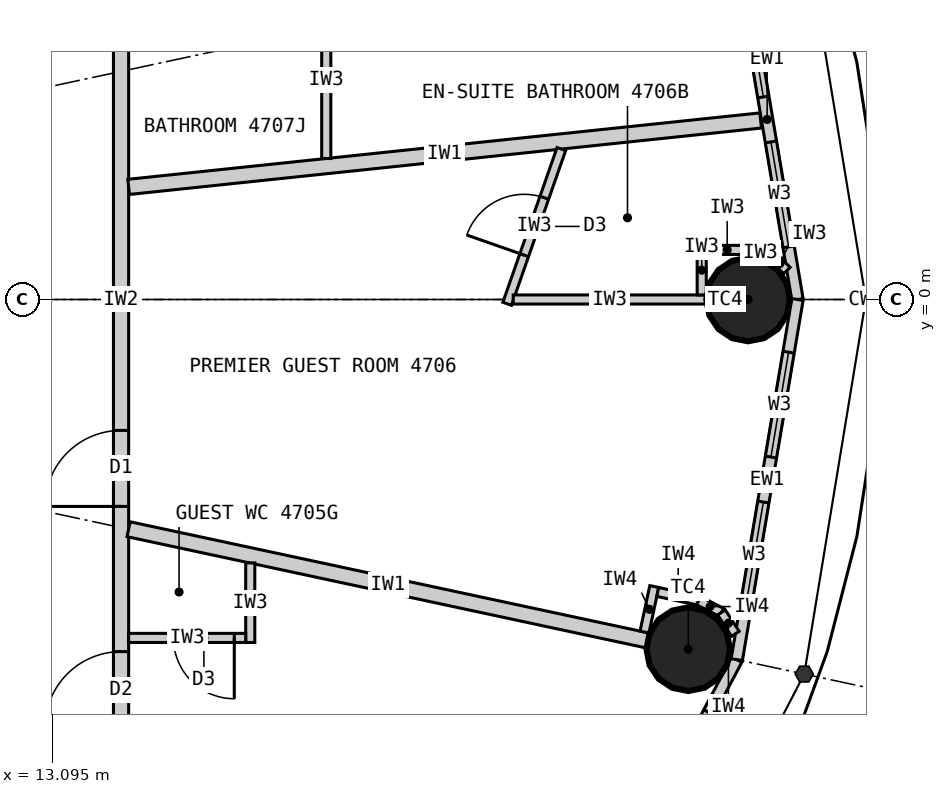
"""IFC4 building model, lengths in metres.
Left out: names, types, materials, properties, quantities, classifications, styles, units other than length and angle.
Written with IfcOpenShell. Run it as: python <this file> out.ifc"""

import sys

from ifc_helpers import new_model, si_unit, direction, frame, frame_2d, origin, origin_2d, place, context, subcontext, project, spatial, rectangle, circle, extrude, element, fill, save


model = new_model("IFC4")
c1 = context("Model", 3, precision=1e-05, world=origin(), true_north=direction((0.0, 1.0)))
c2 = subcontext(c1, "Body", "Model", "MODEL_VIEW")
j1 = project(units=[si_unit("LENGTHUNIT", "METRE"), si_unit("PLANEANGLEUNIT", "RADIAN")], contexts=[c1])
p1 = place(None, origin())
s1 = spatial("IfcSite", under=j1, at=p1, CompositionType="ELEMENT")
p2 = place(p1, origin())
s2 = spatial("IfcBuilding", under=s1, at=p2, CompositionType="ELEMENT")
p3 = place(p2, frame((0.0, 0.0, 176.4)))
s3 = spatial("IfcBuildingStorey", under=s2, at=p3, CompositionType="ELEMENT", Elevation=176.4)
for number, where, z_axis, x_axis in (
    (1, (22.25, 0.0, 0.0), (0.0, 0.0, 1.0), (1.0, 0.0, 0.0)),
    (2, (21.463, -4.601, 0.0), (0.0, 0.0, 1.0), (1.0, 0.0, 0.0)),
):
    element("IfcColumn", number, at=place(p3, frame(where, z_axis=z_axis, x_axis=x_axis)), inside=s3, PredefinedType="COLUMN", context=c2, shape_type="SweptSolid", body=[
        extrude(circle(Radius=0.55, at=origin_2d()), origin(), (0.0, 0.0, 1.0), 3.3),
    ])
p4 = place(p3, frame((22.9, 0.0, 0.0), z_axis=(0.0, 0.0, 1.0), x_axis=(-0.166162111254, 0.986098449843, 0.0)))
e3 = element("IfcWall", 3, at=p4, inside=s3, PredefinedType="ELEMENTEDWALL", context=c2, shape_type="SweptSolid", body=[
    extrude(rectangle(XDim=4.805, YDim=0.15, at=frame_2d((2.402, 0.0))), origin(), (0.0, 0.0, 1.0), 3.12),
])
p5 = place(p4, frame((0.702, 0.0, 0.9)))
e4 = element("IfcOpeningElement", 4, at=p5, cuts=e3, PredefinedType="OPENING", context=c2, shape_type="SweptSolid", body=[
    extrude(rectangle(XDim=1.4, YDim=1.9, at=frame_2d((0.7, 0.95))), frame((0.0, 0.085, 0.0), z_axis=(0.0, -1.0, 0.0), x_axis=(1.0, 0.0, 0.0)), (0.0, 0.0, 1.0), 0.17),
])
p6 = place(p4, frame((2.702, 0.0, 0.9)))
e5 = element("IfcOpeningElement", 5, at=p6, cuts=e3, PredefinedType="OPENING", context=c2, shape_type="SweptSolid", body=[
    extrude(rectangle(XDim=1.4, YDim=1.9, at=frame_2d((0.7, 0.95))), frame((0.0, 0.085, 0.0), z_axis=(0.0, -1.0, 0.0), x_axis=(1.0, 0.0, 0.0)), (0.0, 0.0, 1.0), 0.17),
])
p7 = place(p3, frame((19.772, -9.132, 0.0), z_axis=(0.0, 0.0, 1.0), x_axis=(0.468428906714, 0.883501193748, 0.0)))
e6 = element("IfcWall", 6, at=p7, inside=s3, PredefinedType="ELEMENTEDWALL", context=c2, shape_type="SweptSolid", body=[
    extrude(rectangle(XDim=4.974, YDim=0.15, at=frame_2d((2.487, 0.0))), origin(), (0.0, 0.0, 1.0), 3.12),
])
p8 = place(p7, frame((0.787, 0.0, 0.9)))
e7 = element("IfcOpeningElement", 7, at=p8, cuts=e6, PredefinedType="OPENING", context=c2, shape_type="SweptSolid", body=[
    extrude(rectangle(XDim=1.4, YDim=1.9, at=frame_2d((0.7, 0.95))), frame((0.0, 0.085, 0.0), z_axis=(0.0, -1.0, 0.0), x_axis=(1.0, 0.0, 0.0)), (0.0, 0.0, 1.0), 0.17),
])
p9 = place(p7, frame((2.787, 0.0, 0.9)))
e8 = element("IfcOpeningElement", 8, at=p9, cuts=e6, PredefinedType="OPENING", context=c2, shape_type="SweptSolid", body=[
    extrude(rectangle(XDim=1.4, YDim=1.9, at=frame_2d((0.7, 0.95))), frame((0.0, 0.085, 0.0), z_axis=(0.0, -1.0, 0.0), x_axis=(1.0, 0.0, 0.0)), (0.0, 0.0, 1.0), 0.17),
])
p10 = place(p3, frame((22.102, -4.738, 0.0), z_axis=(0.0, 0.0, 1.0), x_axis=(0.166162111254, 0.986098449843, 0.0)))
e9 = element("IfcWall", 9, at=p10, inside=s3, PredefinedType="ELEMENTEDWALL", context=c2, shape_type="SweptSolid", body=[
    extrude(rectangle(XDim=4.805, YDim=0.15, at=frame_2d((2.402, 0.0))), origin(), (0.0, 0.0, 1.0), 3.12),
])
p11 = place(p10, frame((0.702, 0.0, 0.9)))
e10 = element("IfcOpeningElement", 10, at=p11, cuts=e9, PredefinedType="OPENING", context=c2, shape_type="SweptSolid", body=[
    extrude(rectangle(XDim=1.4, YDim=1.9, at=frame_2d((0.7, 0.95))), frame((0.0, 0.085, 0.0), z_axis=(0.0, -1.0, 0.0), x_axis=(1.0, 0.0, 0.0)), (0.0, 0.0, 1.0), 0.17),
])
p12 = place(p10, frame((2.702, 0.0, 0.9)))
e11 = element("IfcOpeningElement", 11, at=p12, cuts=e9, PredefinedType="OPENING", context=c2, shape_type="SweptSolid", body=[
    extrude(rectangle(XDim=1.4, YDim=1.9, at=frame_2d((0.7, 0.95))), frame((0.0, 0.085, 0.0), z_axis=(0.0, -1.0, 0.0), x_axis=(1.0, 0.0, 0.0)), (0.0, 0.0, 1.0), 0.17),
])
p13 = place(p3, frame((14.0, -9.9, 0.0), z_axis=(0.0, 0.0, 1.0), x_axis=(0.0, 1.0, 0.0)))
e12 = element("IfcWall", 12, at=p13, inside=s3, PredefinedType="PARTITIONING", context=c2, shape_type="SweptSolid", body=[
    extrude(rectangle(XDim=19.8, YDim=0.2, at=frame_2d((9.9, 0.0))), origin(), (0.0, 0.0, 1.0), 3.12),
])
p14 = place(p13, frame((4.268, 0.0, 0.0)))
e13 = element("IfcOpeningElement", 13, at=p14, cuts=e12, PredefinedType="OPENING", context=c2, shape_type="SweptSolid", body=[
    extrude(rectangle(XDim=1.0, YDim=2.2, at=frame_2d((0.5, 1.1))), frame((0.0, 0.11, 0.0), z_axis=(0.0, -1.0, 0.0), x_axis=(1.0, 0.0, 0.0)), (0.0, 0.0, 1.0), 0.22),
])
p15 = place(p13, frame((7.177, 0.0, 0.0)))
e14 = element("IfcOpeningElement", 14, at=p15, cuts=e12, PredefinedType="OPENING", context=c2, shape_type="SweptSolid", body=[
    extrude(rectangle(XDim=1.0, YDim=2.2, at=frame_2d((0.5, 1.1))), frame((0.0, 0.11, 0.0), z_axis=(0.0, -1.0, 0.0), x_axis=(1.0, 0.0, 0.0)), (0.0, 0.0, 1.0), 0.22),
])
p16 = place(p13, frame((17.701, 0.0, 0.0)))
e15 = element("IfcOpeningElement", 15, at=p16, cuts=e12, PredefinedType="OPENING", context=c2, shape_type="SweptSolid", body=[
    extrude(rectangle(XDim=1.0, YDim=2.2, at=frame_2d((0.5, 1.1))), frame((0.0, 0.11, 0.0), z_axis=(0.0, -1.0, 0.0), x_axis=(1.0, 0.0, 0.0)), (0.0, 0.0, 1.0), 0.22),
])
p17 = place(p3, frame((14.1, 1.481, 0.0), z_axis=(0.0, 0.0, 1.0), x_axis=(0.994524794819, 0.104500873159, 0.0)))
e16 = element("IfcWall", 16, at=p17, inside=s3, PredefinedType="PARTITIONING", context=c2, shape_type="SweptSolid", body=[
    extrude(rectangle(XDim=8.362, YDim=0.2, at=frame_2d((4.181, 0.0))), origin(), (0.0, 0.0, 1.0), 2.47),
])
p18 = place(p3, frame((14.1, -3.022, 0.0), z_axis=(0.0, 0.0, 1.0), x_axis=(0.977790639684, -0.209584028367, 0.0)))
e17 = element("IfcWall", 17, at=p18, inside=s3, PredefinedType="PARTITIONING", context=c2, shape_type="SweptSolid", body=[
    extrude(rectangle(XDim=6.98, YDim=0.2, at=frame_2d((3.49, 0.0))), origin(), (0.0, 0.0, 1.0), 2.42),
])
p19 = place(p3, frame((15.7, -3.465, 0.0), z_axis=(0.0, 0.0, 1.0), x_axis=(0.0, -1.0, 0.0)))
e18 = element("IfcWall", 18, at=p19, inside=s3, PredefinedType="PARTITIONING", context=c2, shape_type="SweptSolid", body=[
    extrude(rectangle(XDim=1.047, YDim=0.12, at=frame_2d((0.523, 0.0))), origin(), (0.0, 0.0, 1.0), 3.12),
])
p20 = place(p3, frame((14.1, -4.452, 0.0), z_axis=(0.0, 0.0, 1.0), x_axis=(1.0, 0.0, 0.0)))
e19 = element("IfcWall", 19, at=p20, inside=s3, PredefinedType="PARTITIONING", context=c2, shape_type="SweptSolid", body=[
    extrude(rectangle(XDim=1.54, YDim=0.12, at=frame_2d((0.77, 0.0))), origin(), (0.0, 0.0, 1.0), 3.12),
])
p21 = place(p20, frame((0.59, 0.0, 0.0)))
e20 = element("IfcOpeningElement", 20, at=p21, cuts=e19, PredefinedType="OPENING", context=c2, shape_type="SweptSolid", body=[
    extrude(rectangle(XDim=0.8, YDim=2.1, at=frame_2d((0.4, 1.05))), frame((0.0, 0.07, 0.0), z_axis=(0.0, -1.0, 0.0), x_axis=(1.0, 0.0, 0.0)), (0.0, 0.0, 1.0), 0.14),
])
p22 = place(p3, frame((19.793, 1.979, 0.0), z_axis=(0.0, 0.0, 1.0), x_axis=(-0.330587353123, -0.943775398045, 0.0)))
e21 = element("IfcWall", 21, at=p22, inside=s3, PredefinedType="PARTITIONING", context=c2, shape_type="SweptSolid", body=[
    extrude(rectangle(XDim=2.157, YDim=0.12, at=frame_2d((1.079, 0.0))), origin(), (0.0, 0.0, 1.0), 3.12),
])
p23 = place(p22, frame((0.678, 0.0, 0.0)))
e22 = element("IfcOpeningElement", 22, at=p23, cuts=e21, PredefinedType="OPENING", context=c2, shape_type="SweptSolid", body=[
    extrude(rectangle(XDim=0.8, YDim=2.1, at=frame_2d((0.4, 1.05))), frame((0.0, 0.07, 0.0), z_axis=(0.0, -1.0, 0.0), x_axis=(1.0, 0.0, 0.0)), (0.0, 0.0, 1.0), 0.14),
])
p24 = place(p3, frame((19.16, 0.0, 0.0), z_axis=(0.0, 0.0, 1.0), x_axis=(1.0, 0.0, 0.0)))
e23 = element("IfcWall", 23, at=p24, inside=s3, PredefinedType="PARTITIONING", context=c2, shape_type="SweptSolid", body=[
    extrude(rectangle(XDim=2.54, YDim=0.12, at=frame_2d((1.27, 0.0))), origin(), (0.0, 0.0, 1.0), 2.42),
])
p25 = place(p3, frame((21.64, 0.06, 0.0), z_axis=(0.0, 0.0, 1.0), x_axis=(0.0, 1.0, 0.0)))
e24 = element("IfcWall", 24, at=p25, inside=s3, PredefinedType="PARTITIONING", context=c2, shape_type="SweptSolid", body=[
    extrude(rectangle(XDim=0.652, YDim=0.12, at=frame_2d((0.326, 0.0))), origin(), (0.0, 0.0, 1.0), 3.12),
])
p26 = place(p3, frame((21.7, 0.652, 0.0), z_axis=(0.0, 0.0, 1.0), x_axis=(1.0, 0.0, 0.0)))
e25 = element("IfcWall", 25, at=p26, inside=s3, PredefinedType="PARTITIONING", context=c2, shape_type="SweptSolid", body=[
    extrude(rectangle(XDim=0.55, YDim=0.12, at=frame_2d((0.275, 0.0))), origin(), (0.0, 0.0, 1.0), 3.12),
])
p27 = place(p3, frame((22.25, 0.652, 0.0), z_axis=(0.0, 0.0, 1.0), x_axis=(0.965922233104, -0.258832454679, 0.0)))
e26 = element("IfcWall", 26, at=p27, inside=s3, PredefinedType="PARTITIONING", context=c2, shape_type="SweptSolid", body=[
    extrude(rectangle(XDim=0.338, YDim=0.12, at=frame_2d((0.169, 0.0))), origin(), (0.0, 0.0, 1.0), 3.12),
])
p28 = place(p3, frame((22.576, 0.565, 0.0), z_axis=(0.0, 0.0, 1.0), x_axis=(0.706639272724, -0.707573980757, 0.0)))
e27 = element("IfcWall", 27, at=p28, inside=s3, PredefinedType="PARTITIONING", context=c2, shape_type="SweptSolid", body=[
    extrude(rectangle(XDim=0.261, YDim=0.12, at=frame_2d((0.131, 0.0))), origin(), (0.0, 0.0, 1.0), 3.12),
])
p29 = place(p3, frame((16.7, 1.855, 0.0), z_axis=(0.0, 0.0, 1.0), x_axis=(0.0, 1.0, 0.0)))
e28 = element("IfcWall", 28, at=p29, inside=s3, PredefinedType="PARTITIONING", context=c2, shape_type="SweptSolid", body=[
    extrude(rectangle(XDim=2.067, YDim=0.12, at=frame_2d((1.033, 0.0))), origin(), (0.0, 0.0, 1.0), 3.12),
])
p30 = place(p3, frame((20.887, -4.375, 0.0), z_axis=(0.0, 0.0, 1.0), x_axis=(0.209746941802, 0.977755705892, 0.0)))
e29 = element("IfcWall", 29, at=p30, inside=s3, PredefinedType="PARTITIONING", context=c2, shape_type="SweptSolid", body=[
    extrude(rectangle(XDim=0.612, YDim=0.12, at=frame_2d((0.306, 0.0))), origin(), (0.0, 0.0, 1.0), 3.12),
])
p31 = place(p3, frame((21.062, -3.848, 0.0), z_axis=(0.0, 0.0, 1.0), x_axis=(0.977789415726, -0.209589738521, 0.0)))
e30 = element("IfcWall", 30, at=p31, inside=s3, PredefinedType="PARTITIONING", context=c2, shape_type="SweptSolid", body=[
    extrude(rectangle(XDim=0.55, YDim=0.12, at=frame_2d((0.275, 0.0))), origin(), (0.0, 0.0, 1.0), 3.12),
])
p32 = place(p3, frame((21.599, -3.963, 0.0), z_axis=(0.0, 0.0, 1.0), x_axis=(0.890193602875, -0.455582428766, 0.0)))
e31 = element("IfcWall", 31, at=p32, inside=s3, PredefinedType="PARTITIONING", context=c2, shape_type="SweptSolid", body=[
    extrude(rectangle(XDim=0.338, YDim=0.12, at=frame_2d((0.169, 0.0))), origin(), (0.0, 0.0, 1.0), 3.12),
])
p33 = place(p3, frame((21.9, -4.117, 0.0), z_axis=(0.0, 0.0, 1.0), x_axis=(0.543582688681, -0.839355622228, 0.0)))
e32 = element("IfcWall", 32, at=p33, inside=s3, PredefinedType="PARTITIONING", context=c2, shape_type="SweptSolid", body=[
    extrude(rectangle(XDim=0.336, YDim=0.12, at=frame_2d((0.168, 0.0))), origin(), (0.0, 0.0, 1.0), 3.12),
])
p34 = place(p5, origin())
e33 = element("IfcWindow", 33, at=p34, inside=s3, PartitioningType="SINGLE_PANEL", PredefinedType="WINDOW", context=c2, shape_type="SweptSolid", body=[
    extrude(rectangle(XDim=1.4, YDim=1.9, at=frame_2d((0.7, 0.95))), frame((0.0, 0.03, 0.0), z_axis=(0.0, -1.0, 0.0), x_axis=(1.0, 0.0, 0.0)), (0.0, 0.0, 1.0), 0.06),
])
fill(e4, e33)
p35 = place(p6, origin())
e34 = element("IfcWindow", 34, at=p35, inside=s3, PartitioningType="SINGLE_PANEL", PredefinedType="WINDOW", context=c2, shape_type="SweptSolid", body=[
    extrude(rectangle(XDim=1.4, YDim=1.9, at=frame_2d((0.7, 0.95))), frame((0.0, 0.03, 0.0), z_axis=(0.0, -1.0, 0.0), x_axis=(1.0, 0.0, 0.0)), (0.0, 0.0, 1.0), 0.06),
])
fill(e5, e34)
p36 = place(p9, origin())
e35 = element("IfcWindow", 35, at=p36, inside=s3, PartitioningType="SINGLE_PANEL", PredefinedType="WINDOW", context=c2, shape_type="SweptSolid", body=[
    extrude(rectangle(XDim=1.4, YDim=1.9, at=frame_2d((0.7, 0.95))), frame((0.0, 0.03, 0.0), z_axis=(0.0, -1.0, 0.0), x_axis=(1.0, 0.0, 0.0)), (0.0, 0.0, 1.0), 0.06),
])
fill(e8, e35)
p37 = place(p11, origin())
e36 = element("IfcWindow", 36, at=p37, inside=s3, PartitioningType="SINGLE_PANEL", PredefinedType="WINDOW", context=c2, shape_type="SweptSolid", body=[
    extrude(rectangle(XDim=1.4, YDim=1.9, at=frame_2d((0.7, 0.95))), frame((0.0, 0.03, 0.0), z_axis=(0.0, -1.0, 0.0), x_axis=(1.0, 0.0, 0.0)), (0.0, 0.0, 1.0), 0.06),
])
fill(e10, e36)
p38 = place(p12, origin())
e37 = element("IfcWindow", 37, at=p38, inside=s3, PartitioningType="SINGLE_PANEL", PredefinedType="WINDOW", context=c2, shape_type="SweptSolid", body=[
    extrude(rectangle(XDim=1.4, YDim=1.9, at=frame_2d((0.7, 0.95))), frame((0.0, 0.03, 0.0), z_axis=(0.0, -1.0, 0.0), x_axis=(1.0, 0.0, 0.0)), (0.0, 0.0, 1.0), 0.06),
])
fill(e11, e37)
p39 = place(p21, origin())
e38 = element("IfcDoor", 38, at=p39, inside=s3, OperationType="SINGLE_SWING_RIGHT", PredefinedType="DOOR", context=c2, shape_type="SweptSolid", body=[
    extrude(rectangle(XDim=0.8, YDim=2.1, at=frame_2d((0.4, 1.05))), frame((0.0, 0.025, 0.0), z_axis=(0.0, -1.0, 0.0), x_axis=(1.0, 0.0, 0.0)), (0.0, 0.0, 1.0), 0.05),
])
fill(e20, e38)
p40 = place(p14, origin())
e39 = element("IfcDoor", 39, at=p40, inside=s3, OperationType="SINGLE_SWING_LEFT", PredefinedType="DOOR", context=c2, shape_type="SweptSolid", body=[
    extrude(rectangle(XDim=1.0, YDim=2.2, at=frame_2d((0.5, 1.1))), frame((0.0, 0.025, 0.0), z_axis=(0.0, -1.0, 0.0), x_axis=(1.0, 0.0, 0.0)), (0.0, 0.0, 1.0), 0.05),
])
fill(e13, e39)
p41 = place(p23, origin())
e40 = element("IfcDoor", 40, at=p41, inside=s3, OperationType="SINGLE_SWING_RIGHT", PredefinedType="DOOR", context=c2, shape_type="SweptSolid", body=[
    extrude(rectangle(XDim=0.8, YDim=2.1, at=frame_2d((0.4, 1.05))), frame((0.0, 0.025, 0.0), z_axis=(0.0, -1.0, 0.0), x_axis=(1.0, 0.0, 0.0)), (0.0, 0.0, 1.0), 0.05),
])
fill(e22, e40)
p42 = place(p15, origin())
e41 = element("IfcDoor", 41, at=p42, inside=s3, OperationType="SINGLE_SWING_LEFT", PredefinedType="DOOR", context=c2, shape_type="SweptSolid", body=[
    extrude(rectangle(XDim=1.0, YDim=2.2, at=frame_2d((0.5, 1.1))), frame((0.0, 0.025, 0.0), z_axis=(0.0, -1.0, 0.0), x_axis=(1.0, 0.0, 0.0)), (0.0, 0.0, 1.0), 0.05),
])
fill(e14, e41)
save(model, sys.argv[1])
